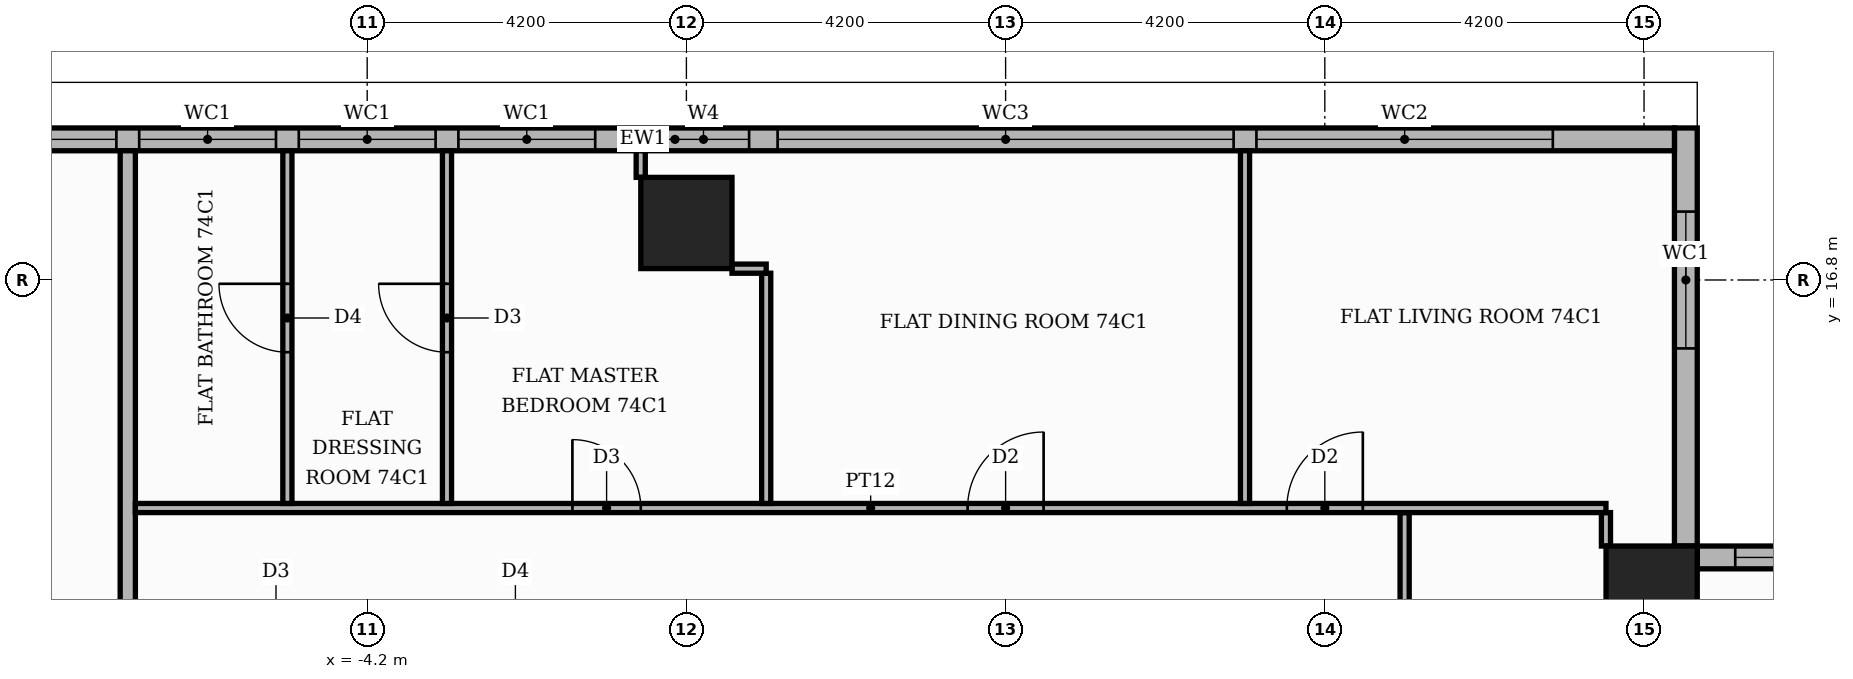
"""IFC4 building model, lengths in metres.
Left out: names, types, materials, properties, quantities, classifications, styles, units other than length and angle.
Written with IfcOpenShell. Run it as: python <this file> out.ifc"""

import sys

from ifc_helpers import new_model, si_unit, direction, frame, frame_2d, origin, origin_2d, place, context, subcontext, project, spatial, rectangle, extrude, element, fill, save


model = new_model("IFC4")
c1 = context("Model", 3, precision=1e-05, world=origin(), true_north=direction((0.0, 1.0)))
c2 = subcontext(c1, "Body", "Model", "MODEL_VIEW")
j1 = project(units=[si_unit("LENGTHUNIT", "METRE"), si_unit("PLANEANGLEUNIT", "RADIAN")], contexts=[c1])
p1 = place(None, origin())
s1 = spatial("IfcSite", under=j1, at=p1, CompositionType="ELEMENT")
p2 = place(p1, origin())
s2 = spatial("IfcBuilding", under=s1, at=p2, CompositionType="ELEMENT")
p3 = place(p2, frame((0.0, 0.0, 308.4)))
s3 = spatial("IfcBuildingStorey", under=s2, at=p3, CompositionType="ELEMENT", Elevation=308.4)
for number, where, z_axis, x_axis in (
    (1, (12.7, 12.7, 0.0), (0.0, 0.0, 1.0), (1.0, 0.0, 0.0)),
    (2, (0.0, 17.55, 0.0), (0.0, 0.0, 1.0), (1.0, 0.0, 0.0)),
):
    element("IfcColumn", number, at=place(p3, frame(where, z_axis=z_axis, x_axis=x_axis)), inside=s3, PredefinedType="COLUMN", context=c2, shape_type="SweptSolid", body=[
        extrude(rectangle(XDim=1.2, YDim=1.2, at=origin_2d()), origin(), (0.0, 0.0, 1.0), 3.9),
    ])
p4 = place(p3, frame((18.5, 13.15, 0.0), z_axis=(0.0, 0.0, 1.0), x_axis=(-1.0, 0.0, 0.0)))
e3 = element("IfcWall", 3, at=p4, inside=s3, PredefinedType="STANDARD", context=c2, shape_type="SweptSolid", body=[
    extrude(rectangle(XDim=5.2, YDim=0.3, at=frame_2d((2.6, 0.0))), origin(), (0.0, 0.0, 1.0), 3.55),
])
p5 = place(p4, frame((0.8, 0.0, 0.6)))
e4 = element("IfcOpeningElement", 4, at=p5, cuts=e3, PredefinedType="OPENING", context=c2, shape_type="SweptSolid", body=[
    extrude(rectangle(XDim=3.9, YDim=2.4, at=frame_2d((1.95, 1.2))), frame((0.0, 0.16, 0.0), z_axis=(0.0, -1.0, 0.0), x_axis=(1.0, 0.0, 0.0)), (0.0, 0.0, 1.0), 0.32),
])
p6 = place(p3, frame((13.15, 13.3, 0.0), z_axis=(0.0, 0.0, 1.0), x_axis=(0.0, 1.0, 0.0)))
e5 = element("IfcWall", 5, at=p6, inside=s3, PredefinedType="STANDARD", context=c2, shape_type="SweptSolid", body=[
    extrude(rectangle(XDim=5.5, YDim=0.3, at=frame_2d((2.75, 0.0))), origin(), (0.0, 0.0, 1.0), 3.55),
])
p7 = place(p6, frame((2.6, 0.0, 0.6)))
e6 = element("IfcOpeningElement", 6, at=p7, cuts=e5, PredefinedType="OPENING", context=c2, shape_type="SweptSolid", body=[
    extrude(rectangle(XDim=1.8, YDim=2.4, at=frame_2d((0.9, 1.2))), frame((0.0, 0.16, 0.0), z_axis=(0.0, -1.0, 0.0), x_axis=(1.0, 0.0, 0.0)), (0.0, 0.0, 1.0), 0.32),
])
p8 = place(p3, frame((13.0, 18.65, 0.0), z_axis=(0.0, 0.0, 1.0), x_axis=(-1.0, 0.0, 0.0)))
e7 = element("IfcWall", 7, at=p8, inside=s3, PredefinedType="STANDARD", context=c2, shape_type="SweptSolid", body=[
    extrude(rectangle(XDim=26.3, YDim=0.3, at=frame_2d((13.15, 0.0))), origin(), (0.0, 0.0, 1.0), 3.55),
])
p9 = place(p8, frame((1.6, 0.0, 0.6)))
e8 = element("IfcOpeningElement", 8, at=p9, cuts=e7, PredefinedType="OPENING", context=c2, shape_type="SweptSolid", body=[
    extrude(rectangle(XDim=3.9, YDim=2.4, at=frame_2d((1.95, 1.2))), frame((0.0, 0.16, 0.0), z_axis=(0.0, -1.0, 0.0), x_axis=(1.0, 0.0, 0.0)), (0.0, 0.0, 1.0), 0.32),
])
p10 = place(p8, frame((5.8, 0.0, 0.6)))
e9 = element("IfcOpeningElement", 9, at=p10, cuts=e7, PredefinedType="OPENING", context=c2, shape_type="SweptSolid", body=[
    extrude(rectangle(XDim=6.0, YDim=2.4, at=frame_2d((3.0, 1.2))), frame((0.0, 0.16, 0.0), z_axis=(0.0, -1.0, 0.0), x_axis=(1.0, 0.0, 0.0)), (0.0, 0.0, 1.0), 0.32),
])
p11 = place(p8, frame((14.2, 0.0, 0.6)))
e10 = element("IfcOpeningElement", 10, at=p11, cuts=e7, PredefinedType="OPENING", context=c2, shape_type="SweptSolid", body=[
    extrude(rectangle(XDim=1.8, YDim=2.4, at=frame_2d((0.9, 1.2))), frame((0.0, 0.16, 0.0), z_axis=(0.0, -1.0, 0.0), x_axis=(1.0, 0.0, 0.0)), (0.0, 0.0, 1.0), 0.32),
])
p12 = place(p8, frame((16.3, 0.0, 0.6)))
e11 = element("IfcOpeningElement", 11, at=p12, cuts=e7, PredefinedType="OPENING", context=c2, shape_type="SweptSolid", body=[
    extrude(rectangle(XDim=1.8, YDim=2.4, at=frame_2d((0.9, 1.2))), frame((0.0, 0.16, 0.0), z_axis=(0.0, -1.0, 0.0), x_axis=(1.0, 0.0, 0.0)), (0.0, 0.0, 1.0), 0.32),
])
p13 = place(p8, frame((18.4, 0.0, 0.6)))
e12 = element("IfcOpeningElement", 12, at=p13, cuts=e7, PredefinedType="OPENING", context=c2, shape_type="SweptSolid", body=[
    extrude(rectangle(XDim=1.8, YDim=2.4, at=frame_2d((0.9, 1.2))), frame((0.0, 0.16, 0.0), z_axis=(0.0, -1.0, 0.0), x_axis=(1.0, 0.0, 0.0)), (0.0, 0.0, 1.0), 0.32),
])
p14 = place(p8, frame((20.5, 0.0, 0.6)))
e13 = element("IfcOpeningElement", 13, at=p14, cuts=e7, PredefinedType="OPENING", context=c2, shape_type="SweptSolid", body=[
    extrude(rectangle(XDim=3.9, YDim=2.4, at=frame_2d((1.95, 1.2))), frame((0.0, 0.16, 0.0), z_axis=(0.0, -1.0, 0.0), x_axis=(1.0, 0.0, 0.0)), (0.0, 0.0, 1.0), 0.32),
])
p15 = place(p8, frame((12.175, 0.0, 0.9)))
e14 = element("IfcOpeningElement", 14, at=p15, cuts=e7, PredefinedType="OPENING", context=c2, shape_type="SweptSolid", body=[
    extrude(rectangle(XDim=1.2, YDim=2.1, at=frame_2d((0.6, 1.05))), frame((0.0, 0.16, 0.0), z_axis=(0.0, -1.0, 0.0), x_axis=(1.0, 0.0, 0.0)), (0.0, 0.0, 1.0), 0.32),
])
p16 = place(p3, frame((-7.35, 7.45, 0.0), z_axis=(0.0, 0.0, 1.0), x_axis=(0.0, 1.0, 0.0)))
e15 = element("IfcWall", 15, at=p16, inside=s3, PredefinedType="PARTITIONING", context=c2, shape_type="SweptSolid", body=[
    extrude(rectangle(XDim=11.05, YDim=0.2, at=frame_2d((5.525, 0.0))), origin(), (0.0, 0.0, 1.0), 3.55),
])
p17 = place(p3, frame((9.45, 7.45, 0.0), z_axis=(0.0, 0.0, 1.0), x_axis=(0.0, 1.0, 0.0)))
e16 = element("IfcWall", 16, at=p17, inside=s3, PredefinedType="PARTITIONING", context=c2, shape_type="SweptSolid", body=[
    extrude(rectangle(XDim=6.29, YDim=0.12, at=frame_2d((3.145, 0.0))), origin(), (0.0, 0.0, 1.0), 3.55),
])
p18 = place(p17, frame((2.675, 0.0, 0.0)))
e17 = element("IfcOpeningElement", 17, at=p18, cuts=e16, PredefinedType="OPENING", context=c2, shape_type="SweptSolid", body=[
    extrude(rectangle(XDim=0.9, YDim=2.1, at=frame_2d((0.45, 1.05))), frame((0.0, 0.07, 0.0), z_axis=(0.0, -1.0, 0.0), x_axis=(1.0, 0.0, 0.0)), (0.0, 0.0, 1.0), 0.14),
])
p19 = place(p3, frame((12.099, 13.3, 0.0), z_axis=(0.0, 0.0, 1.0), x_axis=(0.0, 1.0, 0.0)))
e18 = element("IfcWall", 18, at=p19, inside=s3, PredefinedType="PARTITIONING", context=c2, shape_type="SweptSolid", body=[
    extrude(rectangle(XDim=0.44, YDim=0.12, at=frame_2d((0.22, 0.0))), origin(), (0.0, 0.0, 1.0), 3.55),
])
p20 = place(p3, frame((-7.25, 13.8, 0.0), z_axis=(0.0, 0.0, 1.0), x_axis=(1.0, 0.0, 0.0)))
e19 = element("IfcWall", 19, at=p20, inside=s3, PredefinedType="PARTITIONING", context=c2, shape_type="SweptSolid", body=[
    extrude(rectangle(XDim=19.349, YDim=0.12, at=frame_2d((9.675, 0.0))), origin(), (0.0, 0.0, 1.0), 3.55),
])
p21 = place(p20, frame((15.15, 0.0, 0.0)))
e20 = element("IfcOpeningElement", 20, at=p21, cuts=e19, PredefinedType="OPENING", context=c2, shape_type="SweptSolid", body=[
    extrude(rectangle(XDim=1.0, YDim=2.1, at=frame_2d((0.5, 1.05))), frame((0.0, 0.07, 0.0), z_axis=(0.0, -1.0, 0.0), x_axis=(1.0, 0.0, 0.0)), (0.0, 0.0, 1.0), 0.14),
])
p22 = place(p20, frame((10.95, 0.0, 0.0)))
e21 = element("IfcOpeningElement", 21, at=p22, cuts=e19, PredefinedType="OPENING", context=c2, shape_type="SweptSolid", body=[
    extrude(rectangle(XDim=1.0, YDim=2.1, at=frame_2d((0.5, 1.05))), frame((0.0, 0.07, 0.0), z_axis=(0.0, -1.0, 0.0), x_axis=(1.0, 0.0, 0.0)), (0.0, 0.0, 1.0), 0.14),
])
p23 = place(p20, frame((5.75, 0.0, 0.0)))
e22 = element("IfcOpeningElement", 22, at=p23, cuts=e19, PredefinedType="OPENING", context=c2, shape_type="SweptSolid", body=[
    extrude(rectangle(XDim=0.9, YDim=2.1, at=frame_2d((0.45, 1.05))), frame((0.0, 0.07, 0.0), z_axis=(0.0, -1.0, 0.0), x_axis=(1.0, 0.0, 0.0)), (0.0, 0.0, 1.0), 0.14),
])
p24 = place(p3, frame((-5.25, 13.86, 0.0), z_axis=(0.0, 0.0, 1.0), x_axis=(0.0, 1.0, 0.0)))
e23 = element("IfcWall", 23, at=p24, inside=s3, PredefinedType="PARTITIONING", context=c2, shape_type="SweptSolid", body=[
    extrude(rectangle(XDim=4.64, YDim=0.12, at=frame_2d((2.32, 0.0))), origin(), (0.0, 0.0, 1.0), 3.55),
])
p25 = place(p24, frame((1.99, 0.0, 0.0)))
e24 = element("IfcOpeningElement", 24, at=p25, cuts=e23, PredefinedType="OPENING", context=c2, shape_type="SweptSolid", body=[
    extrude(rectangle(XDim=0.9, YDim=2.1, at=frame_2d((0.45, 1.05))), frame((0.0, 0.07, 0.0), z_axis=(0.0, -1.0, 0.0), x_axis=(1.0, 0.0, 0.0)), (0.0, 0.0, 1.0), 0.14),
])
p26 = place(p3, frame((-3.15, 13.86, 0.0), z_axis=(0.0, 0.0, 1.0), x_axis=(0.0, 1.0, 0.0)))
e25 = element("IfcWall", 25, at=p26, inside=s3, PredefinedType="PARTITIONING", context=c2, shape_type="SweptSolid", body=[
    extrude(rectangle(XDim=4.64, YDim=0.12, at=frame_2d((2.32, 0.0))), origin(), (0.0, 0.0, 1.0), 3.55),
])
p27 = place(p26, frame((1.99, 0.0, 0.0)))
e26 = element("IfcOpeningElement", 26, at=p27, cuts=e25, PredefinedType="OPENING", context=c2, shape_type="SweptSolid", body=[
    extrude(rectangle(XDim=0.9, YDim=2.1, at=frame_2d((0.45, 1.05))), frame((0.0, 0.07, 0.0), z_axis=(0.0, -1.0, 0.0), x_axis=(1.0, 0.0, 0.0)), (0.0, 0.0, 1.0), 0.14),
])
p28 = place(p3, frame((1.05, 13.86, 0.0), z_axis=(0.0, 0.0, 1.0), x_axis=(0.0, 1.0, 0.0)))
e27 = element("IfcWall", 27, at=p28, inside=s3, PredefinedType="PARTITIONING", context=c2, shape_type="SweptSolid", body=[
    extrude(rectangle(XDim=3.029, YDim=0.12, at=frame_2d((1.514, 0.0))), origin(), (0.0, 0.0, 1.0), 3.55),
])
p29 = place(p3, frame((7.35, 13.86, 0.0), z_axis=(0.0, 0.0, 1.0), x_axis=(0.0, 1.0, 0.0)))
e28 = element("IfcWall", 28, at=p29, inside=s3, PredefinedType="PARTITIONING", context=c2, shape_type="SweptSolid", body=[
    extrude(rectangle(XDim=4.64, YDim=0.12, at=frame_2d((2.32, 0.0))), origin(), (0.0, 0.0, 1.0), 3.55),
])
p30 = place(p3, frame((0.6, 16.949, 0.0), z_axis=(0.0, 0.0, 1.0), x_axis=(1.0, 0.0, 0.0)))
e29 = element("IfcWall", 29, at=p30, inside=s3, PredefinedType="PARTITIONING", context=c2, shape_type="SweptSolid", body=[
    extrude(rectangle(XDim=0.45, YDim=0.12, at=frame_2d((0.225, 0.0))), origin(), (0.0, 0.0, 1.0), 3.55),
])
p31 = place(p3, frame((-0.601, 18.15, 0.0), z_axis=(0.0, 0.0, 1.0), x_axis=(0.0, 1.0, 0.0)))
e30 = element("IfcWall", 30, at=p31, inside=s3, PredefinedType="PARTITIONING", context=c2, shape_type="SweptSolid", body=[
    extrude(rectangle(XDim=0.35, YDim=0.12, at=frame_2d((0.175, 0.0))), origin(), (0.0, 0.0, 1.0), 3.55),
])
p32 = place(p5, origin())
e31 = element("IfcWindow", 31, at=p32, inside=s3, PartitioningType="SINGLE_PANEL", PredefinedType="WINDOW", context=c2, shape_type="SweptSolid", body=[
    extrude(rectangle(XDim=3.9, YDim=2.4, at=frame_2d((1.95, 1.2))), frame((0.0, 0.03, 0.0), z_axis=(0.0, -1.0, 0.0), x_axis=(1.0, 0.0, 0.0)), (0.0, 0.0, 1.0), 0.06),
])
fill(e4, e31)
p33 = place(p7, origin())
e32 = element("IfcWindow", 32, at=p33, inside=s3, PartitioningType="SINGLE_PANEL", PredefinedType="WINDOW", context=c2, shape_type="SweptSolid", body=[
    extrude(rectangle(XDim=1.8, YDim=2.4, at=frame_2d((0.9, 1.2))), frame((0.0, 0.03, 0.0), z_axis=(0.0, -1.0, 0.0), x_axis=(1.0, 0.0, 0.0)), (0.0, 0.0, 1.0), 0.06),
])
fill(e6, e32)
p34 = place(p9, origin())
e33 = element("IfcWindow", 33, at=p34, inside=s3, PartitioningType="SINGLE_PANEL", PredefinedType="WINDOW", context=c2, shape_type="SweptSolid", body=[
    extrude(rectangle(XDim=3.9, YDim=2.4, at=frame_2d((1.95, 1.2))), frame((0.0, 0.03, 0.0), z_axis=(0.0, -1.0, 0.0), x_axis=(1.0, 0.0, 0.0)), (0.0, 0.0, 1.0), 0.06),
])
fill(e8, e33)
p35 = place(p10, origin())
e34 = element("IfcWindow", 34, at=p35, inside=s3, PartitioningType="SINGLE_PANEL", PredefinedType="WINDOW", context=c2, shape_type="SweptSolid", body=[
    extrude(rectangle(XDim=6.0, YDim=2.4, at=frame_2d((3.0, 1.2))), frame((0.0, 0.03, 0.0), z_axis=(0.0, -1.0, 0.0), x_axis=(1.0, 0.0, 0.0)), (0.0, 0.0, 1.0), 0.06),
])
fill(e9, e34)
p36 = place(p11, origin())
e35 = element("IfcWindow", 35, at=p36, inside=s3, PartitioningType="SINGLE_PANEL", PredefinedType="WINDOW", context=c2, shape_type="SweptSolid", body=[
    extrude(rectangle(XDim=1.8, YDim=2.4, at=frame_2d((0.9, 1.2))), frame((0.0, 0.03, 0.0), z_axis=(0.0, -1.0, 0.0), x_axis=(1.0, 0.0, 0.0)), (0.0, 0.0, 1.0), 0.06),
])
fill(e10, e35)
p37 = place(p12, origin())
e36 = element("IfcWindow", 36, at=p37, inside=s3, PartitioningType="SINGLE_PANEL", PredefinedType="WINDOW", context=c2, shape_type="SweptSolid", body=[
    extrude(rectangle(XDim=1.8, YDim=2.4, at=frame_2d((0.9, 1.2))), frame((0.0, 0.03, 0.0), z_axis=(0.0, -1.0, 0.0), x_axis=(1.0, 0.0, 0.0)), (0.0, 0.0, 1.0), 0.06),
])
fill(e11, e36)
p38 = place(p13, origin())
e37 = element("IfcWindow", 37, at=p38, inside=s3, PartitioningType="SINGLE_PANEL", PredefinedType="WINDOW", context=c2, shape_type="SweptSolid", body=[
    extrude(rectangle(XDim=1.8, YDim=2.4, at=frame_2d((0.9, 1.2))), frame((0.0, 0.03, 0.0), z_axis=(0.0, -1.0, 0.0), x_axis=(1.0, 0.0, 0.0)), (0.0, 0.0, 1.0), 0.06),
])
fill(e12, e37)
p39 = place(p14, origin())
e38 = element("IfcWindow", 38, at=p39, inside=s3, PartitioningType="SINGLE_PANEL", PredefinedType="WINDOW", context=c2, shape_type="SweptSolid", body=[
    extrude(rectangle(XDim=3.9, YDim=2.4, at=frame_2d((1.95, 1.2))), frame((0.0, 0.03, 0.0), z_axis=(0.0, -1.0, 0.0), x_axis=(1.0, 0.0, 0.0)), (0.0, 0.0, 1.0), 0.06),
])
fill(e13, e38)
p40 = place(p15, origin())
e39 = element("IfcWindow", 39, at=p40, inside=s3, PartitioningType="SINGLE_PANEL", PredefinedType="WINDOW", context=c2, shape_type="SweptSolid", body=[
    extrude(rectangle(XDim=1.2, YDim=2.1, at=frame_2d((0.6, 1.05))), frame((0.0, 0.03, 0.0), z_axis=(0.0, -1.0, 0.0), x_axis=(1.0, 0.0, 0.0)), (0.0, 0.0, 1.0), 0.06),
])
fill(e14, e39)
p41 = place(p21, origin())
e40 = element("IfcDoor", 40, at=p41, inside=s3, OperationType="SINGLE_SWING_RIGHT", PredefinedType="DOOR", context=c2, shape_type="SweptSolid", body=[
    extrude(rectangle(XDim=1.0, YDim=2.1, at=frame_2d((0.5, 1.05))), frame((0.0, 0.025, 0.0), z_axis=(0.0, -1.0, 0.0), x_axis=(1.0, 0.0, 0.0)), (0.0, 0.0, 1.0), 0.05),
])
fill(e20, e40)
p42 = place(p22, origin())
e41 = element("IfcDoor", 41, at=p42, inside=s3, OperationType="SINGLE_SWING_RIGHT", PredefinedType="DOOR", context=c2, shape_type="SweptSolid", body=[
    extrude(rectangle(XDim=1.0, YDim=2.1, at=frame_2d((0.5, 1.05))), frame((0.0, 0.025, 0.0), z_axis=(0.0, -1.0, 0.0), x_axis=(1.0, 0.0, 0.0)), (0.0, 0.0, 1.0), 0.05),
])
fill(e21, e41)
p43 = place(p23, origin())
e42 = element("IfcDoor", 42, at=p43, inside=s3, OperationType="SINGLE_SWING_LEFT", PredefinedType="DOOR", context=c2, shape_type="SweptSolid", body=[
    extrude(rectangle(XDim=0.9, YDim=2.1, at=frame_2d((0.45, 1.05))), frame((0.0, 0.025, 0.0), z_axis=(0.0, -1.0, 0.0), x_axis=(1.0, 0.0, 0.0)), (0.0, 0.0, 1.0), 0.05),
])
fill(e22, e42)
p44 = place(p27, origin())
e43 = element("IfcDoor", 43, at=p44, inside=s3, OperationType="SINGLE_SWING_RIGHT", PredefinedType="DOOR", context=c2, shape_type="SweptSolid", body=[
    extrude(rectangle(XDim=0.9, YDim=2.1, at=frame_2d((0.45, 1.05))), frame((0.0, 0.025, 0.0), z_axis=(0.0, -1.0, 0.0), x_axis=(1.0, 0.0, 0.0)), (0.0, 0.0, 1.0), 0.05),
])
fill(e26, e43)
p45 = place(p25, origin())
e44 = element("IfcDoor", 44, at=p45, inside=s3, OperationType="SINGLE_SWING_RIGHT", PredefinedType="DOOR", context=c2, shape_type="SweptSolid", body=[
    extrude(rectangle(XDim=0.9, YDim=2.1, at=frame_2d((0.45, 1.05))), frame((0.0, 0.025, 0.0), z_axis=(0.0, -1.0, 0.0), x_axis=(1.0, 0.0, 0.0)), (0.0, 0.0, 1.0), 0.05),
])
fill(e24, e44)
save(model, sys.argv[1])
